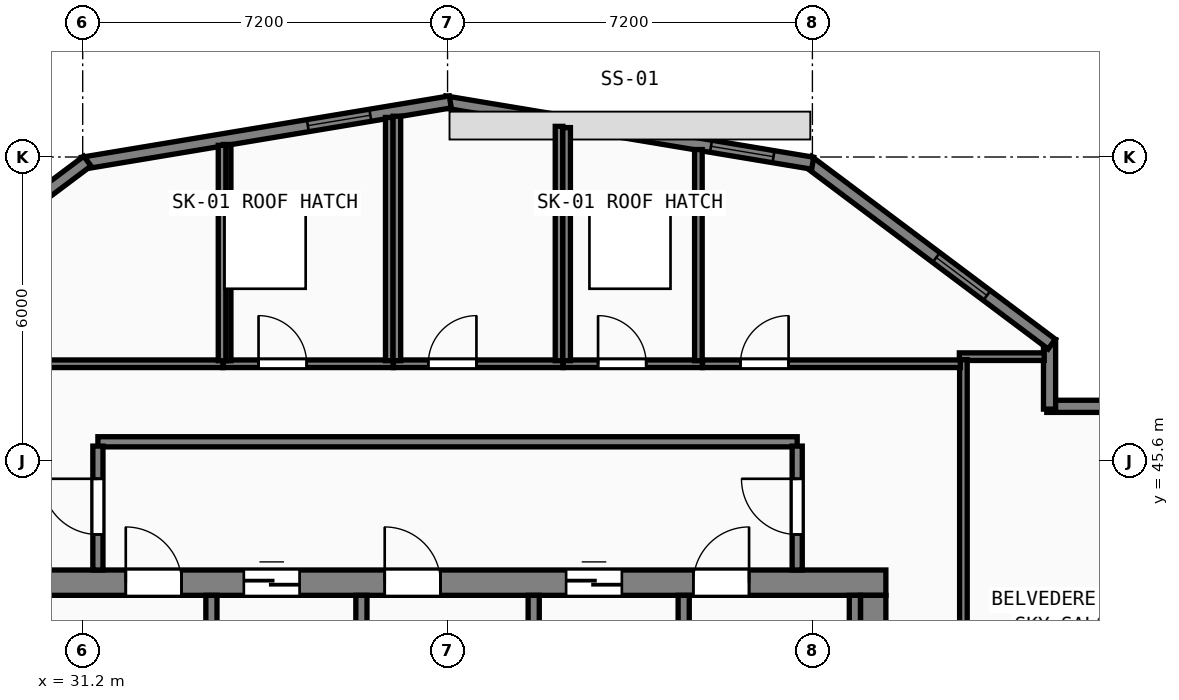
"""IFC4 building model, lengths in metres.
Left out: names, types, materials, properties, quantities, classifications, styles, units other than length and angle.
Written with IfcOpenShell. Run it as: python <this file> out.ifc"""

import sys

from ifc_helpers import new_model, si_unit, direction, frame, frame_2d, origin, origin_2d, place, context, subcontext, project, spatial, rectangle, hollow_rectangle, extrude, element, fill, save


model = new_model("IFC4")
c1 = context("Model", 3, precision=1e-05, world=origin(), true_north=direction((0.0, 1.0)))
c2 = subcontext(c1, "Body", "Model", "MODEL_VIEW")
j1 = project(units=[si_unit("LENGTHUNIT", "METRE"), si_unit("PLANEANGLEUNIT", "RADIAN")], contexts=[c1])
p1 = place(None, origin())
s1 = spatial("IfcSite", under=j1, at=p1, CompositionType="ELEMENT")
p2 = place(p1, origin())
s2 = spatial("IfcBuilding", under=s1, at=p2, CompositionType="ELEMENT")
p3 = place(p2, frame((0.0, 0.0, 323.2)))
s3 = spatial("IfcBuildingStorey", under=s2, at=p3, CompositionType="ELEMENT", Elevation=323.2)
p4 = place(p3, frame((29.75, 43.2, 0.0), z_axis=(0.0, 0.0, 1.0), x_axis=(1.0, 0.0, 0.0)))
e1 = element("IfcWall", 1, at=p4, inside=s3, PredefinedType="SHEAR", context=c2, shape_type="SweptSolid", body=[
    extrude(rectangle(XDim=17.3, YDim=0.5, at=frame_2d((8.65, 0.0))), origin(), (0.0, 0.0, 1.0), 4.75),
])
p5 = place(p4, frame((2.3, 0.0, 0.0)))
e2 = element("IfcOpeningElement", 2, at=p5, cuts=e1, PredefinedType="OPENING", context=c2, shape_type="SweptSolid", body=[
    extrude(rectangle(XDim=1.1, YDim=2.15, at=frame_2d((0.55, 1.075))), frame((0.0, 0.26, 0.0), z_axis=(0.0, -1.0, 0.0), x_axis=(1.0, 0.0, 0.0)), (0.0, 0.0, 1.0), 0.52),
])
p6 = place(p4, frame((7.41, 0.0, 0.0)))
e3 = element("IfcOpeningElement", 3, at=p6, cuts=e1, PredefinedType="OPENING", context=c2, shape_type="SweptSolid", body=[
    extrude(rectangle(XDim=1.1, YDim=2.15, at=frame_2d((0.55, 1.075))), frame((0.0, 0.26, 0.0), z_axis=(0.0, -1.0, 0.0), x_axis=(1.0, 0.0, 0.0)), (0.0, 0.0, 1.0), 0.52),
])
p7 = place(p4, frame((13.5, 0.0, 0.0)))
e4 = element("IfcOpeningElement", 4, at=p7, cuts=e1, PredefinedType="OPENING", context=c2, shape_type="SweptSolid", body=[
    extrude(rectangle(XDim=1.1, YDim=2.15, at=frame_2d((0.55, 1.075))), frame((0.0, 0.26, 0.0), z_axis=(0.0, -1.0, 0.0), x_axis=(1.0, 0.0, 0.0)), (0.0, 0.0, 1.0), 0.52),
])
p8 = place(p4, frame((4.63, 0.0, 0.0)))
e5 = element("IfcOpeningElement", 5, at=p8, cuts=e1, PredefinedType="OPENING", context=c2, shape_type="SweptSolid", body=[
    extrude(rectangle(XDim=1.1, YDim=2.2, at=frame_2d((0.55, 1.1))), frame((0.0, 0.26, 0.0), z_axis=(0.0, -1.0, 0.0), x_axis=(1.0, 0.0, 0.0)), (0.0, 0.0, 1.0), 0.52),
])
p9 = place(p4, frame((10.99, 0.0, 0.0)))
e6 = element("IfcOpeningElement", 6, at=p9, cuts=e1, PredefinedType="OPENING", context=c2, shape_type="SweptSolid", body=[
    extrude(rectangle(XDim=1.1, YDim=2.2, at=frame_2d((0.55, 1.1))), frame((0.0, 0.26, 0.0), z_axis=(0.0, -1.0, 0.0), x_axis=(1.0, 0.0, 0.0)), (0.0, 0.0, 1.0), 0.52),
])
p10 = place(p3, frame((46.8, 32.8, 0.0), z_axis=(0.0, 0.0, 1.0), x_axis=(0.0, 1.0, 0.0)))
e7 = element("IfcWall", 7, at=p10, inside=s3, PredefinedType="SHEAR", context=c2, shape_type="SweptSolid", body=[
    extrude(rectangle(XDim=10.15, YDim=0.5, at=frame_2d((5.075, 0.0))), origin(), (0.0, 0.0, 1.0), 4.75),
])
for number, where, z_axis, x_axis in (
    (8, (33.74, 35.39, 0.0), (0.0, 0.0, 1.0), (0.0, 1.0, 0.0)),
    (9, (36.7, 35.39, 0.0), (0.0, 0.0, 1.0), (0.0, 1.0, 0.0)),
    (10, (40.1, 35.39, 0.0), (0.0, 0.0, 1.0), (0.0, 1.0, 0.0)),
    (11, (43.06, 35.39, 0.0), (0.0, 0.0, 1.0), (0.0, 1.0, 0.0)),
    (12, (46.438, 35.39, 0.0), (0.0, 0.0, 1.0), (0.0, 1.0, 0.0)),
):
    element("IfcWall", number, at=place(p3, frame(where, z_axis=z_axis, x_axis=x_axis)), inside=s3, PredefinedType="SHEAR", context=c2, shape_type="SweptSolid", body=[
        extrude(rectangle(XDim=7.56, YDim=0.22, at=frame_2d((3.78, 0.0))), origin(), (0.0, 0.0, 1.0), 4.75),
    ])
for number, where, z_axis, x_axis in (
    (13, (31.2, 50.4, 0.0), (0.0, 0.0, 1.0), (1.0, 0.0, 0.0)),
    (14, (45.6, 50.4, 0.0), (0.0, 0.0, 1.0), (1.0, 0.0, 0.0)),
    (15, (38.4, 50.4, 0.0), (0.0, 0.0, 1.0), (1.0, 0.0, 0.0)),
):
    element("IfcColumn", number, at=place(p3, frame(where, z_axis=z_axis, x_axis=x_axis)), inside=s3, PredefinedType="COLUMN", context=c2, shape_type="SweptSolid", body=[
        extrude(hollow_rectangle(XDim=0.6, YDim=0.6, WallThickness=0.024, at=origin_2d()), origin(), (0.0, 0.0, 1.0), 5.0),
    ])
p11 = place(p3, frame((51.535, 46.68, 0.0), z_axis=(0.0, 0.0, 1.0), x_axis=(-1.0, 0.0, 0.0)))
e16 = element("IfcWall", 16, at=p11, inside=s3, PredefinedType="SOLIDWALL", context=c2, shape_type="SweptSolid", body=[
    extrude(rectangle(XDim=1.31, YDim=0.24, at=frame_2d((0.655, 0.0))), origin(), (0.0, 0.0, 1.0), 4.75),
])
p12 = place(p3, frame((50.28, 46.625, 0.0), z_axis=(0.0, 0.0, 1.0), x_axis=(0.0, 1.0, 0.0)))
e17 = element("IfcWall", 17, at=p12, inside=s3, PredefinedType="SOLIDWALL", context=c2, shape_type="SweptSolid", body=[
    extrude(rectangle(XDim=1.37, YDim=0.24, at=frame_2d((0.685, 0.0))), origin(), (0.0, 0.0, 1.0), 4.75),
])
p13 = place(p3, frame((50.324, 47.907, 0.0), z_axis=(0.0, 0.0, 1.0), x_axis=(-0.80001459783, 0.599980535734, 0.0)))
e18 = element("IfcWall", 18, at=p13, inside=s3, PredefinedType="SOLIDWALL", context=c2, shape_type="SweptSolid", body=[
    extrude(rectangle(XDim=6.021, YDim=0.24, at=frame_2d((3.01, 0.0))), origin(), (0.0, 0.0, 1.0), 4.75),
])
p14 = place(p13, frame((1.6, 0.0, 0.85)))
e19 = element("IfcOpeningElement", 19, at=p14, cuts=e18, PredefinedType="OPENING", context=c2, shape_type="SweptSolid", body=[
    extrude(rectangle(XDim=1.25, YDim=1.95, at=frame_2d((0.625, 0.975))), frame((0.0, 0.13, 0.0), z_axis=(0.0, -1.0, 0.0), x_axis=(1.0, 0.0, 0.0)), (0.0, 0.0, 1.0), 0.26),
])
p15 = place(p3, frame((45.606, 51.477, 0.0), z_axis=(0.0, 0.0, 1.0), x_axis=(-0.986394820321, 0.164393608283, 0.0)))
e20 = element("IfcWall", 20, at=p15, inside=s3, PredefinedType="SOLIDWALL", context=c2, shape_type="SweptSolid", body=[
    extrude(rectangle(XDim=7.36, YDim=0.24, at=frame_2d((3.68, 0.0))), origin(), (0.0, 0.0, 1.0), 4.75),
])
p16 = place(p15, frame((0.784, 0.0, 0.85)))
e21 = element("IfcOpeningElement", 21, at=p16, cuts=e20, PredefinedType="OPENING", context=c2, shape_type="SweptSolid", body=[
    extrude(rectangle(XDim=1.25, YDim=1.95, at=frame_2d((0.625, 0.975))), frame((0.0, 0.13, 0.0), z_axis=(0.0, -1.0, 0.0), x_axis=(1.0, 0.0, 0.0)), (0.0, 0.0, 1.0), 0.26),
])
p17 = place(p3, frame((38.454, 52.687, 0.0), z_axis=(0.0, 0.0, 1.0), x_axis=(-0.986394820321, -0.164393608283, 0.0)))
e22 = element("IfcWall", 22, at=p17, inside=s3, PredefinedType="SOLIDWALL", context=c2, shape_type="SweptSolid", body=[
    extrude(rectangle(XDim=7.36, YDim=0.24, at=frame_2d((3.68, 0.0))), origin(), (0.0, 0.0, 1.0), 4.75),
])
p18 = place(p17, frame((1.6, 0.0, 0.85)))
e23 = element("IfcOpeningElement", 23, at=p18, cuts=e22, PredefinedType="OPENING", context=c2, shape_type="SweptSolid", body=[
    extrude(rectangle(XDim=1.25, YDim=1.95, at=frame_2d((0.625, 0.975))), frame((0.0, 0.13, 0.0), z_axis=(0.0, -1.0, 0.0), x_axis=(1.0, 0.0, 0.0)), (0.0, 0.0, 1.0), 0.26),
])
p19 = place(p3, frame((31.292, 51.519, 0.0), z_axis=(0.0, 0.0, 1.0), x_axis=(-0.8, -0.6, 0.0)))
e24 = element("IfcWall", 24, at=p19, inside=s3, PredefinedType="SOLIDWALL", context=c2, shape_type="SweptSolid", body=[
    extrude(rectangle(XDim=6.021, YDim=0.24, at=frame_2d((3.01, 0.0))), origin(), (0.0, 0.0, 1.0), 4.75),
])
p20 = place(p19, frame((1.6, 0.0, 0.85)))
e25 = element("IfcOpeningElement", 25, at=p20, cuts=e24, PredefinedType="OPENING", context=c2, shape_type="SweptSolid", body=[
    extrude(rectangle(XDim=1.25, YDim=1.95, at=frame_2d((0.625, 0.975))), frame((0.0, 0.13, 0.0), z_axis=(0.0, -1.0, 0.0), x_axis=(1.0, 0.0, 0.0)), (0.0, 0.0, 1.0), 0.26),
])
p21 = place(p3, frame((31.5, 45.98, 0.0), z_axis=(0.0, 0.0, 1.0), x_axis=(1.0, 0.0, 0.0)))
e26 = element("IfcWall", 26, at=p21, inside=s3, PredefinedType="SOLIDWALL", context=c2, shape_type="SweptSolid", body=[
    extrude(rectangle(XDim=13.8, YDim=0.2, at=frame_2d((6.9, 0.0))), origin(), (0.0, 0.0, 1.0), 4.75),
])
p22 = place(p3, frame((31.5, 43.45, 0.0), z_axis=(0.0, 0.0, 1.0), x_axis=(0.0, 1.0, 0.0)))
e27 = element("IfcWall", 27, at=p22, inside=s3, PredefinedType="SOLIDWALL", context=c2, shape_type="SweptSolid", body=[
    extrude(rectangle(XDim=2.445, YDim=0.2, at=frame_2d((1.223, 0.0))), origin(), (0.0, 0.0, 1.0), 4.75),
])
p23 = place(p22, frame((1.8, 0.0, 0.0), z_axis=(0.0, 0.0, 1.0), x_axis=(-1.0, 0.0, 0.0)))
e28 = element("IfcOpeningElement", 28, at=p23, cuts=e27, PredefinedType="OPENING", context=c2, shape_type="SweptSolid", body=[
    extrude(rectangle(XDim=1.1, YDim=2.15, at=frame_2d((0.55, 1.075))), frame((0.0, 0.11, 0.0), z_axis=(0.0, -1.0, 0.0), x_axis=(1.0, 0.0, 0.0)), (0.0, 0.0, 1.0), 0.22),
])
p24 = place(p3, frame((45.3, 43.45, 0.0), z_axis=(0.0, 0.0, 1.0), x_axis=(0.0, 1.0, 0.0)))
e29 = element("IfcWall", 29, at=p24, inside=s3, PredefinedType="SOLIDWALL", context=c2, shape_type="SweptSolid", body=[
    extrude(rectangle(XDim=2.445, YDim=0.2, at=frame_2d((1.223, 0.0))), origin(), (0.0, 0.0, 1.0), 4.75),
])
p25 = place(p24, frame((0.7, 0.0, 0.0)))
e30 = element("IfcOpeningElement", 30, at=p25, cuts=e29, PredefinedType="OPENING", context=c2, shape_type="SweptSolid", body=[
    extrude(rectangle(XDim=1.1, YDim=2.15, at=frame_2d((0.55, 1.075))), frame((0.0, 0.11, 0.0), z_axis=(0.0, -1.0, 0.0), x_axis=(1.0, 0.0, 0.0)), (0.0, 0.0, 1.0), 0.22),
])
p26 = place(p3, frame((33.97, 47.52, 0.0), z_axis=(0.0, 0.0, 1.0), x_axis=(1.0, 0.0, 0.0)))
e31 = element("IfcWall", 31, at=p26, inside=s3, PredefinedType="PARTITIONING", context=c2, shape_type="SweptSolid", body=[
    extrude(rectangle(XDim=3.36, YDim=0.15, at=frame_2d((1.68, 0.0))), origin(), (0.0, 0.0, 1.0), 4.75),
])
p27 = place(p26, frame((0.7, 0.0, 0.0)))
e32 = element("IfcOpeningElement", 32, at=p27, cuts=e31, PredefinedType="OPENING", context=c2, shape_type="SweptSolid", body=[
    extrude(rectangle(XDim=0.95, YDim=2.12, at=frame_2d((0.475, 1.06))), frame((0.0, 0.085, 0.0), z_axis=(0.0, -1.0, 0.0), x_axis=(1.0, 0.0, 0.0)), (0.0, 0.0, 1.0), 0.17),
])
p28 = place(p3, frame((34.05, 47.58, 0.0), z_axis=(0.0, 0.0, 1.0), x_axis=(0.0, 1.0, 0.0)))
e33 = element("IfcWall", 33, at=p28, inside=s3, PredefinedType="PARTITIONING", context=c2, shape_type="SweptSolid", body=[
    extrude(rectangle(XDim=4.267, YDim=0.15, at=frame_2d((2.133, 0.0))), origin(), (0.0, 0.0, 1.0), 4.75),
])
p29 = place(p3, frame((37.25, 47.58, 0.0), z_axis=(0.0, 0.0, 1.0), x_axis=(0.0, 1.0, 0.0)))
e34 = element("IfcWall", 34, at=p29, inside=s3, PredefinedType="PARTITIONING", context=c2, shape_type="SweptSolid", body=[
    extrude(rectangle(XDim=4.8, YDim=0.15, at=frame_2d((2.4, 0.0))), origin(), (0.0, 0.0, 1.0), 4.75),
])
p30 = place(p3, frame((37.332, 47.52, 0.0), z_axis=(0.0, 0.0, 1.0), x_axis=(1.0, 0.0, 0.0)))
e35 = element("IfcWall", 35, at=p30, inside=s3, PredefinedType="PARTITIONING", context=c2, shape_type="SweptSolid", body=[
    extrude(rectangle(XDim=3.348, YDim=0.15, at=frame_2d((1.674, 0.0))), origin(), (0.0, 0.0, 1.0), 4.75),
])
p31 = place(p30, frame((0.688, 0.0, 0.0)))
e36 = element("IfcOpeningElement", 36, at=p31, cuts=e35, PredefinedType="OPENING", context=c2, shape_type="SweptSolid", body=[
    extrude(rectangle(XDim=0.95, YDim=2.12, at=frame_2d((0.475, 1.06))), frame((0.0, 0.085, 0.0), z_axis=(0.0, -1.0, 0.0), x_axis=(1.0, 0.0, 0.0)), (0.0, 0.0, 1.0), 0.17),
])
p32 = place(p3, frame((37.4, 47.58, 0.0), z_axis=(0.0, 0.0, 1.0), x_axis=(0.0, 1.0, 0.0)))
e37 = element("IfcWall", 37, at=p32, inside=s3, PredefinedType="PARTITIONING", context=c2, shape_type="SweptSolid", body=[
    extrude(rectangle(XDim=4.825, YDim=0.15, at=frame_2d((2.413, 0.0))), origin(), (0.0, 0.0, 1.0), 4.75),
])
p33 = place(p3, frame((40.6, 47.58, 0.0), z_axis=(0.0, 0.0, 1.0), x_axis=(0.0, 1.0, 0.0)))
e38 = element("IfcWall", 38, at=p33, inside=s3, PredefinedType="PARTITIONING", context=c2, shape_type="SweptSolid", body=[
    extrude(rectangle(XDim=4.625, YDim=0.15, at=frame_2d((2.312, 0.0))), origin(), (0.0, 0.0, 1.0), 4.75),
])
p34 = place(p3, frame((40.682, 47.52, 0.0), z_axis=(0.0, 0.0, 1.0), x_axis=(1.0, 0.0, 0.0)))
e39 = element("IfcWall", 39, at=p34, inside=s3, PredefinedType="PARTITIONING", context=c2, shape_type="SweptSolid", body=[
    extrude(rectangle(XDim=2.748, YDim=0.15, at=frame_2d((1.374, 0.0))), origin(), (0.0, 0.0, 1.0), 4.75),
])
p35 = place(p34, frame((0.688, 0.0, 0.0)))
e40 = element("IfcOpeningElement", 40, at=p35, cuts=e39, PredefinedType="OPENING", context=c2, shape_type="SweptSolid", body=[
    extrude(rectangle(XDim=0.95, YDim=2.12, at=frame_2d((0.475, 1.06))), frame((0.0, 0.085, 0.0), z_axis=(0.0, -1.0, 0.0), x_axis=(1.0, 0.0, 0.0)), (0.0, 0.0, 1.0), 0.17),
])
p36 = place(p3, frame((40.75, 47.58, 0.0), z_axis=(0.0, 0.0, 1.0), x_axis=(0.0, 1.0, 0.0)))
e41 = element("IfcWall", 41, at=p36, inside=s3, PredefinedType="PARTITIONING", context=c2, shape_type="SweptSolid", body=[
    extrude(rectangle(XDim=4.6, YDim=0.15, at=frame_2d((2.3, 0.0))), origin(), (0.0, 0.0, 1.0), 4.75),
])
p37 = place(p3, frame((43.35, 47.58, 0.0), z_axis=(0.0, 0.0, 1.0), x_axis=(0.0, 1.0, 0.0)))
e42 = element("IfcWall", 42, at=p37, inside=s3, PredefinedType="PARTITIONING", context=c2, shape_type="SweptSolid", body=[
    extrude(rectangle(XDim=4.167, YDim=0.15, at=frame_2d((2.083, 0.0))), origin(), (0.0, 0.0, 1.0), 4.75),
])
p38 = place(p3, frame((48.5, 47.66, 0.0), z_axis=(0.0, 0.0, 1.0), x_axis=(1.0, 0.0, 0.0)))
e43 = element("IfcWall", 43, at=p38, inside=s3, PredefinedType="PARTITIONING", context=c2, shape_type="SweptSolid", body=[
    extrude(rectangle(XDim=1.675, YDim=0.15, at=frame_2d((0.837, 0.0))), origin(), (0.0, 0.0, 1.0), 4.75),
])
p39 = place(p3, frame((48.58, 33.46, 0.0), z_axis=(0.0, 0.0, 1.0), x_axis=(0.0, 1.0, 0.0)))
e44 = element("IfcWall", 44, at=p39, inside=s3, PredefinedType="PARTITIONING", context=c2, shape_type="SweptSolid", body=[
    extrude(rectangle(XDim=14.14, YDim=0.15, at=frame_2d((7.07, 0.0))), origin(), (0.0, 0.0, 1.0), 4.75),
])
p40 = place(p39, frame((4.06, 0.0, 0.0)))
e45 = element("IfcOpeningElement", 45, at=p40, cuts=e44, PredefinedType="OPENING", context=c2, shape_type="SweptSolid", body=[
    extrude(rectangle(XDim=0.95, YDim=2.12, at=frame_2d((0.475, 1.06))), frame((0.0, 0.085, 0.0), z_axis=(0.0, -1.0, 0.0), x_axis=(1.0, 0.0, 0.0)), (0.0, 0.0, 1.0), 0.17),
])
p41 = place(p3, frame((28.28, 47.52, 0.0), z_axis=(0.0, 0.0, 1.0), x_axis=(1.0, 0.0, 0.0)))
e46 = element("IfcWall", 46, at=p41, inside=s3, PredefinedType="PARTITIONING", context=c2, shape_type="SweptSolid", body=[
    extrude(rectangle(XDim=5.688, YDim=0.15, at=frame_2d((2.844, 0.0))), origin(), (0.0, 0.0, 1.0), 4.75),
])
p42 = place(p41, frame((0.17, 0.0, 0.0)))
e47 = element("IfcOpeningElement", 47, at=p42, cuts=e46, PredefinedType="OPENING", context=c2, shape_type="SweptSolid", body=[
    extrude(rectangle(XDim=0.95, YDim=2.12, at=frame_2d((0.475, 1.06))), frame((0.0, 0.085, 0.0), z_axis=(0.0, -1.0, 0.0), x_axis=(1.0, 0.0, 0.0)), (0.0, 0.0, 1.0), 0.17),
])
p43 = place(p3, frame((33.95, 47.58, 0.0), z_axis=(0.0, 0.0, 1.0), x_axis=(0.0, 1.0, 0.0)))
e48 = element("IfcWall", 48, at=p43, inside=s3, PredefinedType="PARTITIONING", context=c2, shape_type="SweptSolid", body=[
    extrude(rectangle(XDim=4.25, YDim=0.15, at=frame_2d((2.125, 0.0))), origin(), (0.0, 0.0, 1.0), 4.75),
])
p44 = place(p3, frame((43.432, 47.52, 0.0), z_axis=(0.0, 0.0, 1.0), x_axis=(1.0, 0.0, 0.0)))
e49 = element("IfcWall", 49, at=p44, inside=s3, PredefinedType="PARTITIONING", context=c2, shape_type="SweptSolid", body=[
    extrude(rectangle(XDim=5.088, YDim=0.15, at=frame_2d((2.544, 0.0))), origin(), (0.0, 0.0, 1.0), 4.75),
])
p45 = place(p44, frame((0.748, 0.0, 0.0)))
e50 = element("IfcOpeningElement", 50, at=p45, cuts=e49, PredefinedType="OPENING", context=c2, shape_type="SweptSolid", body=[
    extrude(rectangle(XDim=0.95, YDim=2.12, at=frame_2d((0.475, 1.06))), frame((0.0, 0.085, 0.0), z_axis=(0.0, -1.0, 0.0), x_axis=(1.0, 0.0, 0.0)), (0.0, 0.0, 1.0), 0.17),
])
p46 = place(p14, origin())
e51 = element("IfcWindow", 51, at=p46, inside=s3, PartitioningType="SINGLE_PANEL", PredefinedType="WINDOW", context=c2, shape_type="SweptSolid", body=[
    extrude(rectangle(XDim=1.25, YDim=1.95, at=frame_2d((0.625, 0.975))), frame((0.0, 0.03, 0.0), z_axis=(0.0, -1.0, 0.0), x_axis=(1.0, 0.0, 0.0)), (0.0, 0.0, 1.0), 0.06),
])
fill(e19, e51)
p47 = place(p16, origin())
e52 = element("IfcWindow", 52, at=p47, inside=s3, PartitioningType="SINGLE_PANEL", PredefinedType="WINDOW", context=c2, shape_type="SweptSolid", body=[
    extrude(rectangle(XDim=1.25, YDim=1.95, at=frame_2d((0.625, 0.975))), frame((0.0, 0.03, 0.0), z_axis=(0.0, -1.0, 0.0), x_axis=(1.0, 0.0, 0.0)), (0.0, 0.0, 1.0), 0.06),
])
fill(e21, e52)
p48 = place(p18, origin())
e53 = element("IfcWindow", 53, at=p48, inside=s3, PartitioningType="SINGLE_PANEL", PredefinedType="WINDOW", context=c2, shape_type="SweptSolid", body=[
    extrude(rectangle(XDim=1.25, YDim=1.95, at=frame_2d((0.625, 0.975))), frame((0.0, 0.03, 0.0), z_axis=(0.0, -1.0, 0.0), x_axis=(1.0, 0.0, 0.0)), (0.0, 0.0, 1.0), 0.06),
])
fill(e23, e53)
p49 = place(p3, frame((0.0, 0.0, -0.24)))
p50 = place(p49, frame((34.8, 49.8, 0.0)))
p51 = place(p50, frame((0.0, 0.0, 0.19)))
e54 = element("IfcWindow", 54, at=p51, inside=s3, PartitioningType="SINGLE_PANEL", PredefinedType="SKYLIGHT", context=c2, shape_type="SweptSolid", body=[
    extrude(rectangle(XDim=1.6, YDim=1.6, at=origin_2d()), origin(), (0.0, 0.0, 1.0), 0.05),
])
p52 = place(p49, frame((42.0, 49.8, 0.0)))
p53 = place(p52, frame((0.0, 0.0, 0.19)))
e55 = element("IfcWindow", 55, at=p53, inside=s3, PartitioningType="SINGLE_PANEL", PredefinedType="SKYLIGHT", context=c2, shape_type="SweptSolid", body=[
    extrude(rectangle(XDim=1.6, YDim=1.6, at=origin_2d()), origin(), (0.0, 0.0, 1.0), 0.05),
])
p54 = place(p5, origin())
e56 = element("IfcDoor", 56, at=p54, inside=s3, OperationType="SINGLE_SWING_LEFT", PredefinedType="DOOR", context=c2, shape_type="SweptSolid", body=[
    extrude(rectangle(XDim=1.1, YDim=2.15, at=frame_2d((0.55, 1.075))), frame((0.0, 0.185, 0.0), z_axis=(0.0, -1.0, 0.0), x_axis=(1.0, 0.0, 0.0)), (0.0, 0.0, 1.0), 0.05),
])
fill(e2, e56)
p55 = place(p6, origin())
e57 = element("IfcDoor", 57, at=p55, inside=s3, OperationType="SINGLE_SWING_LEFT", PredefinedType="DOOR", context=c2, shape_type="SweptSolid", body=[
    extrude(rectangle(XDim=1.1, YDim=2.15, at=frame_2d((0.55, 1.075))), frame((0.0, 0.185, 0.0), z_axis=(0.0, -1.0, 0.0), x_axis=(1.0, 0.0, 0.0)), (0.0, 0.0, 1.0), 0.05),
])
fill(e3, e57)
p56 = place(p7, origin())
e58 = element("IfcDoor", 58, at=p56, inside=s3, OperationType="SINGLE_SWING_RIGHT", PredefinedType="DOOR", context=c2, shape_type="SweptSolid", body=[
    extrude(rectangle(XDim=1.1, YDim=2.15, at=frame_2d((0.55, 1.075))), frame((0.0, 0.185, 0.0), z_axis=(0.0, -1.0, 0.0), x_axis=(1.0, 0.0, 0.0)), (0.0, 0.0, 1.0), 0.05),
])
fill(e4, e58)
p57 = place(p23, origin())
e59 = element("IfcDoor", 59, at=p57, inside=s3, OperationType="SINGLE_SWING_LEFT", PredefinedType="DOOR", context=c2, shape_type="SweptSolid", body=[
    extrude(rectangle(XDim=1.1, YDim=2.15, at=frame_2d((0.55, 1.075))), frame((0.0, 0.025, 0.0), z_axis=(0.0, -1.0, 0.0), x_axis=(1.0, 0.0, 0.0)), (0.0, 0.0, 1.0), 0.05),
])
fill(e28, e59)
p58 = place(p25, origin())
e60 = element("IfcDoor", 60, at=p58, inside=s3, OperationType="SINGLE_SWING_RIGHT", PredefinedType="DOOR", context=c2, shape_type="SweptSolid", body=[
    extrude(rectangle(XDim=1.1, YDim=2.15, at=frame_2d((0.55, 1.075))), frame((0.0, 0.025, 0.0), z_axis=(0.0, -1.0, 0.0), x_axis=(1.0, 0.0, 0.0)), (0.0, 0.0, 1.0), 0.05),
])
fill(e30, e60)
p59 = place(p8, origin())
e61 = element("IfcDoor", 61, at=p59, inside=s3, OperationType="SLIDING_TO_LEFT", PredefinedType="DOOR", context=c2, shape_type="SweptSolid", body=[
    extrude(rectangle(XDim=1.1, YDim=2.2, at=frame_2d((0.55, 1.1))), frame((0.0, 0.185, 0.0), z_axis=(0.0, -1.0, 0.0), x_axis=(1.0, 0.0, 0.0)), (0.0, 0.0, 1.0), 0.05),
])
fill(e5, e61)
p60 = place(p9, origin())
e62 = element("IfcDoor", 62, at=p60, inside=s3, OperationType="SLIDING_TO_LEFT", PredefinedType="DOOR", context=c2, shape_type="SweptSolid", body=[
    extrude(rectangle(XDim=1.1, YDim=2.2, at=frame_2d((0.55, 1.1))), frame((0.0, 0.185, 0.0), z_axis=(0.0, -1.0, 0.0), x_axis=(1.0, 0.0, 0.0)), (0.0, 0.0, 1.0), 0.05),
])
fill(e6, e62)
p61 = place(p27, origin())
e63 = element("IfcDoor", 63, at=p61, inside=s3, OperationType="SINGLE_SWING_LEFT", PredefinedType="DOOR", context=c2, shape_type="SweptSolid", body=[
    extrude(rectangle(XDim=0.95, YDim=2.12, at=frame_2d((0.475, 1.06))), frame((0.0, 0.025, 0.0), z_axis=(0.0, -1.0, 0.0), x_axis=(1.0, 0.0, 0.0)), (0.0, 0.0, 1.0), 0.05),
])
fill(e32, e63)
p62 = place(p31, origin())
e64 = element("IfcDoor", 64, at=p62, inside=s3, OperationType="SINGLE_SWING_RIGHT", PredefinedType="DOOR", context=c2, shape_type="SweptSolid", body=[
    extrude(rectangle(XDim=0.95, YDim=2.12, at=frame_2d((0.475, 1.06))), frame((0.0, 0.025, 0.0), z_axis=(0.0, -1.0, 0.0), x_axis=(1.0, 0.0, 0.0)), (0.0, 0.0, 1.0), 0.05),
])
fill(e36, e64)
p63 = place(p35, origin())
e65 = element("IfcDoor", 65, at=p63, inside=s3, OperationType="SINGLE_SWING_LEFT", PredefinedType="DOOR", context=c2, shape_type="SweptSolid", body=[
    extrude(rectangle(XDim=0.95, YDim=2.12, at=frame_2d((0.475, 1.06))), frame((0.0, 0.025, 0.0), z_axis=(0.0, -1.0, 0.0), x_axis=(1.0, 0.0, 0.0)), (0.0, 0.0, 1.0), 0.05),
])
fill(e40, e65)
p64 = place(p45, origin())
e66 = element("IfcDoor", 66, at=p64, inside=s3, OperationType="SINGLE_SWING_RIGHT", PredefinedType="DOOR", context=c2, shape_type="SweptSolid", body=[
    extrude(rectangle(XDim=0.95, YDim=2.12, at=frame_2d((0.475, 1.06))), frame((0.0, 0.025, 0.0), z_axis=(0.0, -1.0, 0.0), x_axis=(1.0, 0.0, 0.0)), (0.0, 0.0, 1.0), 0.05),
])
fill(e50, e66)
save(model, sys.argv[1])
